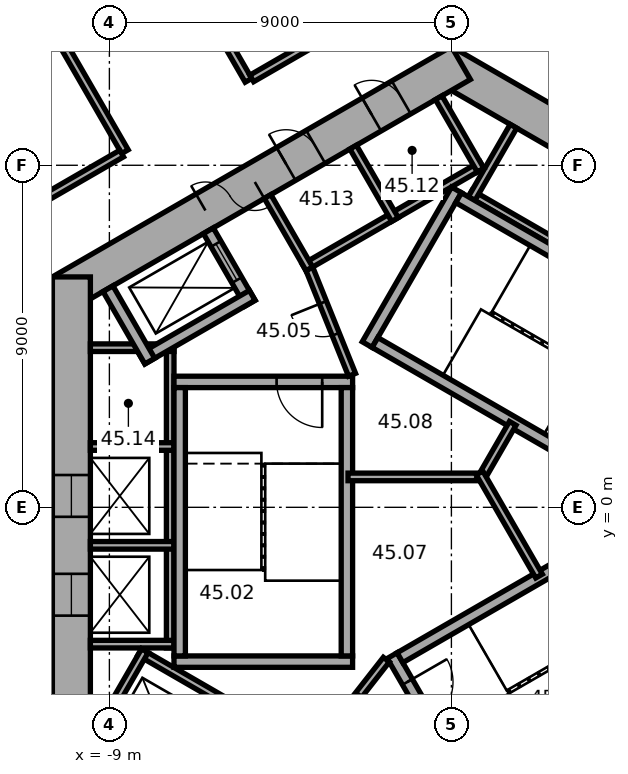
"""IFC4 building model, lengths in metres.
Left out: names, types, materials, properties, quantities, classifications, styles, units other than length and angle.
Written with IfcOpenShell. Run it as: python <this file> out.ifc"""

import sys

from ifc_helpers import new_model, si_unit, direction, frame, frame_2d, origin, place, context, subcontext, project, spatial, rectangle, extrude, element, fill, save


model = new_model("IFC4")
c1 = context("Model", 3, precision=1e-05, world=origin(), true_north=direction((0.0, 1.0)))
c2 = subcontext(c1, "Body", "Model", "MODEL_VIEW")
j1 = project(units=[si_unit("LENGTHUNIT", "METRE"), si_unit("PLANEANGLEUNIT", "RADIAN")], contexts=[c1])
p1 = place(None, origin())
s1 = spatial("IfcSite", under=j1, at=p1, CompositionType="ELEMENT")
p2 = place(p1, origin())
s2 = spatial("IfcBuilding", under=s1, at=p2, CompositionType="ELEMENT")
p3 = place(p2, frame((0.0, 0.0, 183.6)))
s3 = spatial("IfcBuildingStorey", under=s2, at=p3, CompositionType="ELEMENT", Elevation=183.6)
p4 = place(p3, frame((10.25, 5.629, 0.0), z_axis=(0.0, 0.0, 1.0), x_axis=(-0.866022616891, 0.50000482701, 0.0)))
e1 = element("IfcWall", 1, at=p4, inside=s3, PredefinedType="SHEAR", context=c2, shape_type="SweptSolid", body=[
    extrude(rectangle(XDim=12.125, YDim=1.0, at=frame_2d((6.062, 0.0))), origin(), (0.0, 0.0, 1.0), 3.7),
])
p5 = place(p4, frame((5.312, 0.0, 0.0)))
e2 = element("IfcOpeningElement", 2, at=p5, cuts=e1, PredefinedType="OPENING", context=c2, shape_type="SweptSolid", body=[
    extrude(rectangle(XDim=0.9, YDim=2.1, at=frame_2d((0.45, 1.05))), frame((0.0, 0.51, 0.0), z_axis=(0.0, -1.0, 0.0), x_axis=(1.0, 0.0, 0.0)), (0.0, 0.0, 1.0), 1.02),
])
p6 = place(p3, frame((0.25, 11.691, 0.0), z_axis=(0.0, 0.0, 1.0), x_axis=(-0.866022616891, -0.50000482701, 0.0)))
e3 = element("IfcWall", 3, at=p6, inside=s3, PredefinedType="SHEAR", context=c2, shape_type="SweptSolid", body=[
    extrude(rectangle(XDim=12.125, YDim=1.0, at=frame_2d((6.062, 0.0))), origin(), (0.0, 0.0, 1.0), 3.7),
])
p7 = place(p6, frame((6.262, 0.0, 0.0)))
e4 = element("IfcOpeningElement", 4, at=p7, cuts=e3, PredefinedType="OPENING", context=c2, shape_type="SweptSolid", body=[
    extrude(rectangle(XDim=1.5, YDim=2.1, at=frame_2d((0.75, 1.05))), frame((0.0, 0.51, 0.0), z_axis=(0.0, -1.0, 0.0), x_axis=(1.0, 0.0, 0.0)), (0.0, 0.0, 1.0), 1.02),
])
p8 = place(p6, frame((1.812, 0.0, 0.0)))
e5 = element("IfcOpeningElement", 5, at=p8, cuts=e3, PredefinedType="OPENING", context=c2, shape_type="SweptSolid", body=[
    extrude(rectangle(XDim=0.9, YDim=2.1, at=frame_2d((0.45, 1.05))), frame((0.0, 0.51, 0.0), z_axis=(0.0, -1.0, 0.0), x_axis=(1.0, 0.0, 0.0)), (0.0, 0.0, 1.0), 1.02),
])
p9 = place(p6, frame((4.412, 0.0, 0.0)))
e6 = element("IfcOpeningElement", 6, at=p9, cuts=e3, PredefinedType="OPENING", context=c2, shape_type="SweptSolid", body=[
    extrude(rectangle(XDim=0.9, YDim=2.1, at=frame_2d((0.45, 1.05))), frame((0.0, 0.51, 0.0), z_axis=(0.0, -1.0, 0.0), x_axis=(1.0, 0.0, 0.0)), (0.0, 0.0, 1.0), 1.02),
])
p10 = place(p3, frame((-10.0, 6.062, 0.0), z_axis=(0.0, 0.0, 1.0), x_axis=(0.0, -1.0, 0.0)))
e7 = element("IfcWall", 7, at=p10, inside=s3, PredefinedType="SHEAR", context=c2, shape_type="SweptSolid", body=[
    extrude(rectangle(XDim=12.125, YDim=1.0, at=frame_2d((6.062, 0.0))), origin(), (0.0, 0.0, 1.0), 3.7),
])
p11 = place(p10, frame((5.212, 0.0, 0.0)))
e8 = element("IfcOpeningElement", 8, at=p11, cuts=e7, PredefinedType="OPENING", context=c2, shape_type="SweptSolid", body=[
    extrude(rectangle(XDim=1.1, YDim=2.1, at=frame_2d((0.55, 1.05))), frame((0.0, 0.51, 0.0), z_axis=(0.0, -1.0, 0.0), x_axis=(1.0, 0.0, 0.0)), (0.0, 0.0, 1.0), 1.02),
])
p12 = place(p10, frame((7.812, 0.0, 0.0)))
e9 = element("IfcOpeningElement", 9, at=p12, cuts=e7, PredefinedType="OPENING", context=c2, shape_type="SweptSolid", body=[
    extrude(rectangle(XDim=1.1, YDim=2.1, at=frame_2d((0.55, 1.05))), frame((0.0, 0.51, 0.0), z_axis=(0.0, -1.0, 0.0), x_axis=(1.0, 0.0, 0.0)), (0.0, 0.0, 1.0), 1.02),
])
p13 = place(p3, frame((7.424, 4.259, 0.0), z_axis=(0.0, 0.0, 1.0), x_axis=(-0.866026010844, 0.49999894854, 0.0)))
e10 = element("IfcWall", 10, at=p13, inside=s3, PredefinedType="PARTITIONING", context=c2, shape_type="SweptSolid", body=[
    extrude(rectangle(XDim=8.0, YDim=0.2, at=frame_2d((4.0, 0.0))), origin(), (0.0, 0.0, 1.0), 3.42),
])
p14 = place(p3, frame((0.532, 8.122, 0.0), z_axis=(0.0, 0.0, 1.0), x_axis=(0.500077893725, 0.86598042715, 0.0)))
e11 = element("IfcWall", 11, at=p14, inside=s3, PredefinedType="PARTITIONING", context=c2, shape_type="SweptSolid", body=[
    extrude(rectangle(XDim=2.2, YDim=0.2, at=frame_2d((1.1, 0.0))), origin(), (0.0, 0.0, 1.0), 3.42),
])
p15 = place(p3, frame((0.803, 9.009, 0.0), z_axis=(0.0, 0.0, 1.0), x_axis=(-0.866028230842, -0.499995103361, 0.0)))
e12 = element("IfcWall", 12, at=p15, inside=s3, PredefinedType="PARTITIONING", context=c2, shape_type="SweptSolid", body=[
    extrude(rectangle(XDim=5.4, YDim=0.2, at=frame_2d((2.7, 0.0))), origin(), (0.0, 0.0, 1.0), 3.42),
])
p16 = place(p3, frame((0.767, 8.872, 0.0), z_axis=(0.0, 0.0, 1.0), x_axis=(-0.499994660107, 0.866028486751, 0.0)))
e13 = element("IfcWall", 13, at=p16, inside=s3, PredefinedType="PARTITIONING", context=c2, shape_type="SweptSolid", body=[
    extrude(rectangle(XDim=2.2, YDim=0.2, at=frame_2d((1.1, 0.0))), origin(), (0.0, 0.0, 1.0), 3.42),
])
for number, where, z_axis, x_axis in (
    (14, (-1.485, 7.572, 0.0), (0.0, 0.0, 1.0), (-0.5, 0.866, 0.0)),
    (15, (-3.737, 6.272, 0.0), (0.0, 0.0, 1.0), (-0.5, 0.866, 0.0)),
):
    element("IfcWall", number, at=place(p3, frame(where, z_axis=z_axis, x_axis=x_axis)), inside=s3, PredefinedType="PARTITIONING", context=c2, shape_type="SweptSolid", body=[
        extrude(rectangle(XDim=2.2, YDim=0.2, at=frame_2d((1.1, 0.0))), origin(), (0.0, 0.0, 1.0), 3.42),
    ])
p17 = place(p3, frame((-7.4, 4.3, 0.0), z_axis=(0.0, 0.0, 1.0), x_axis=(0.0, -1.0, 0.0)))
e16 = element("IfcWall", 16, at=p17, inside=s3, PredefinedType="PARTITIONING", context=c2, shape_type="SweptSolid", body=[
    extrude(rectangle(XDim=8.0, YDim=0.2, at=frame_2d((4.0, 0.0))), origin(), (0.0, 0.0, 1.0), 3.42),
])
for number, where, z_axis, x_axis in (
    (17, (-7.3, 4.2, 0.0), (0.0, 0.0, 1.0), (-1.0, 0.0, 0.0)),
    (18, (-7.3, 1.6, 0.0), (0.0, 0.0, 1.0), (-1.0, 0.0, 0.0)),
    (19, (-7.3, -1.0, 0.0), (0.0, 0.0, 1.0), (-1.0, 0.0, 0.0)),
    (20, (-7.3, -3.6, 0.0), (0.0, 0.0, 1.0), (-1.0, 0.0, 0.0)),
):
    element("IfcWall", number, at=place(p3, frame(where, z_axis=z_axis, x_axis=x_axis)), inside=s3, PredefinedType="PARTITIONING", context=c2, shape_type="SweptSolid", body=[
        extrude(rectangle(XDim=2.2, YDim=0.2, at=frame_2d((1.1, 0.0))), origin(), (0.0, 0.0, 1.0), 3.42),
    ])
p18 = place(p3, frame((-8.203, -3.809, 0.0), z_axis=(0.0, 0.0, 1.0), x_axis=(0.866028230842, -0.499995103361, 0.0)))
e21 = element("IfcWall", 21, at=p18, inside=s3, PredefinedType="PARTITIONING", context=c2, shape_type="SweptSolid", body=[
    extrude(rectangle(XDim=5.4, YDim=0.2, at=frame_2d((2.7, 0.0))), origin(), (0.0, 0.0, 1.0), 3.42),
])
p19 = place(p3, frame((-8.067, -3.772, 0.0), z_axis=(0.0, 0.0, 1.0), x_axis=(-0.50002983664, -0.866008176907, 0.0)))
e22 = element("IfcWall", 22, at=p19, inside=s3, PredefinedType="PARTITIONING", context=c2, shape_type="SweptSolid", body=[
    extrude(rectangle(XDim=2.2, YDim=0.2, at=frame_2d((1.1, 0.0))), origin(), (0.0, 0.0, 1.0), 3.42),
])
p20 = place(p3, frame((-0.024, -8.559, 0.0), z_axis=(0.0, 0.0, 1.0), x_axis=(0.866026010844, 0.49999894854, 0.0)))
e23 = element("IfcWall", 23, at=p20, inside=s3, PredefinedType="PARTITIONING", context=c2, shape_type="SweptSolid", body=[
    extrude(rectangle(XDim=8.0, YDim=0.2, at=frame_2d((4.0, 0.0))), origin(), (0.0, 0.0, 1.0), 3.42),
])
p21 = place(p3, frame((-2.216, 4.282, 0.0), z_axis=(0.0, 0.0, 1.0), x_axis=(0.499977259774, 0.866038532462, 0.0)))
e24 = element("IfcWall", 24, at=p21, inside=s3, PredefinedType="SHEAR", context=c2, shape_type="SweptSolid", body=[
    extrude(rectangle(XDim=4.7, YDim=0.3, at=frame_2d((2.35, 0.0))), origin(), (0.0, 0.0, 1.0), 3.42),
])
for number, where, z_axis, x_axis in (
    (25, (4.103, 0.807, 0.0), (0.0, 0.0, 1.0), (-0.866, 0.5, 0.0)),
    (26, (6.303, 4.617, 0.0), (0.0, 0.0, 1.0), (-0.866, 0.5, 0.0)),
):
    element("IfcWall", number, at=place(p3, frame(where, z_axis=z_axis, x_axis=x_axis)), inside=s3, PredefinedType="SHEAR", context=c2, shape_type="SweptSolid", body=[
        extrude(rectangle(XDim=7.06, YDim=0.3, at=frame_2d((3.53, 0.0))), origin(), (0.0, 0.0, 1.0), 3.42),
    ])
p22 = place(p3, frame((-2.6, 3.3, 0.0), z_axis=(0.0, 0.0, 1.0), x_axis=(-1.0, 0.0, 0.0)))
e27 = element("IfcWall", 27, at=p22, inside=s3, PredefinedType="SHEAR", context=c2, shape_type="SweptSolid", body=[
    extrude(rectangle(XDim=4.7, YDim=0.3, at=frame_2d((2.35, 0.0))), origin(), (0.0, 0.0, 1.0), 3.42),
])
p23 = place(p22, frame((0.8, 0.0, 0.0)))
e28 = element("IfcOpeningElement", 28, at=p23, cuts=e27, PredefinedType="OPENING", context=c2, shape_type="SweptSolid", body=[
    extrude(rectangle(XDim=1.2, YDim=2.1, at=frame_2d((0.6, 1.05))), frame((0.0, 0.16, 0.0), z_axis=(0.0, -1.0, 0.0), x_axis=(1.0, 0.0, 0.0)), (0.0, 0.0, 1.0), 0.32),
])
p24 = place(p3, frame((-2.6, -4.06, 0.0), z_axis=(0.0, 0.0, 1.0), x_axis=(-1.0, 0.0, 0.0)))
e29 = element("IfcWall", 29, at=p24, inside=s3, PredefinedType="SHEAR", context=c2, shape_type="SweptSolid", body=[
    extrude(rectangle(XDim=4.7, YDim=0.3, at=frame_2d((2.35, 0.0))), origin(), (0.0, 0.0, 1.0), 3.42),
])
for number, where, z_axis, x_axis in (
    (30, (-2.75, 3.15, 0.0), (0.0, 0.0, 1.0), (0.0, -1.0, 0.0)),
    (31, (-7.15, 3.15, 0.0), (0.0, 0.0, 1.0), (0.0, -1.0, 0.0)),
):
    element("IfcWall", number, at=place(p3, frame(where, z_axis=z_axis, x_axis=x_axis)), inside=s3, PredefinedType="SHEAR", context=c2, shape_type="SweptSolid", body=[
        extrude(rectangle(XDim=7.06, YDim=0.3, at=frame_2d((3.53, 0.0))), origin(), (0.0, 0.0, 1.0), 3.42),
    ])
p25 = place(p3, frame((-1.558, -3.902, 0.0), z_axis=(0.0, 0.0, 1.0), x_axis=(0.499977259774, -0.866038532462, 0.0)))
e32 = element("IfcWall", 32, at=p25, inside=s3, PredefinedType="SHEAR", context=c2, shape_type="SweptSolid", body=[
    extrude(rectangle(XDim=4.7, YDim=0.3, at=frame_2d((2.35, 0.0))), origin(), (0.0, 0.0, 1.0), 3.42),
])
p26 = place(p25, frame((0.8, 0.0, 0.0)))
e33 = element("IfcOpeningElement", 33, at=p26, cuts=e32, PredefinedType="OPENING", context=c2, shape_type="SweptSolid", body=[
    extrude(rectangle(XDim=1.2, YDim=2.1, at=frame_2d((0.6, 1.05))), frame((0.0, 0.16, 0.0), z_axis=(0.0, -1.0, 0.0), x_axis=(1.0, 0.0, 0.0)), (0.0, 0.0, 1.0), 0.32),
])
for number, where, z_axis, x_axis in (
    (34, (-1.353, -3.957, 0.0), (0.0, 0.0, 1.0), (0.866, 0.5, 0.0)),
    (35, (0.847, -7.767, 0.0), (0.0, 0.0, 1.0), (0.866, 0.5, 0.0)),
):
    element("IfcWall", number, at=place(p3, frame(where, z_axis=z_axis, x_axis=x_axis)), inside=s3, PredefinedType="SHEAR", context=c2, shape_type="SweptSolid", body=[
        extrude(rectangle(XDim=7.06, YDim=0.3, at=frame_2d((3.53, 0.0))), origin(), (0.0, 0.0, 1.0), 3.42),
    ])
p27 = place(p3, frame((-5.295, 5.372, 0.0), z_axis=(0.0, 0.0, 1.0), x_axis=(-0.500077893725, 0.86598042715, 0.0)))
e36 = element("IfcWall", 36, at=p27, inside=s3, PredefinedType="SHEAR", context=c2, shape_type="SweptSolid", body=[
    extrude(rectangle(XDim=2.2, YDim=0.3, at=frame_2d((1.1, 0.0))), origin(), (0.0, 0.0, 1.0), 3.42),
])
p28 = place(p27, frame((0.7, 0.0, 0.0)))
e37 = element("IfcOpeningElement", 37, at=p28, cuts=e36, PredefinedType="OPENING", context=c2, shape_type="SweptSolid", body=[
    extrude(rectangle(XDim=1.1, YDim=2.1, at=frame_2d((0.55, 1.05))), frame((0.0, 0.16, 0.0), z_axis=(0.0, -1.0, 0.0), x_axis=(1.0, 0.0, 0.0)), (0.0, 0.0, 1.0), 0.32),
])
p29 = place(p3, frame((-5.24, 5.577, 0.0), z_axis=(0.0, 0.0, 1.0), x_axis=(-0.866014461049, -0.500018952895, 0.0)))
e38 = element("IfcWall", 38, at=p29, inside=s3, PredefinedType="SHEAR", context=c2, shape_type="SweptSolid", body=[
    extrude(rectangle(XDim=3.35, YDim=0.3, at=frame_2d((1.675, 0.0))), origin(), (0.0, 0.0, 1.0), 3.42),
])
p30 = place(p3, frame((-7.937, 3.847, 0.0), z_axis=(0.0, 0.0, 1.0), x_axis=(-0.50002983664, 0.866008176907, 0.0)))
e39 = element("IfcWall", 39, at=p30, inside=s3, PredefinedType="SHEAR", context=c2, shape_type="SweptSolid", body=[
    extrude(rectangle(XDim=2.2, YDim=0.3, at=frame_2d((1.1, 0.0))), origin(), (0.0, 0.0, 1.0), 3.42),
])
p31 = place(p3, frame((-2.615, 3.487, 0.0), z_axis=(0.0, 0.0, 1.0), x_axis=(-0.373576831041, 0.92759924068, 0.0)))
e40 = element("IfcWall", 40, at=p31, inside=s3, PredefinedType="PARTITIONING", context=c2, shape_type="SweptSolid", body=[
    extrude(rectangle(XDim=3.002, YDim=0.2, at=frame_2d((1.501, 0.0))), origin(), (0.0, 0.0, 1.0), 3.42),
])
p32 = place(p31, frame((1.15, 0.0, 0.0)))
e41 = element("IfcOpeningElement", 41, at=p32, cuts=e40, PredefinedType="OPENING", context=c2, shape_type="SweptSolid", body=[
    extrude(rectangle(XDim=0.9, YDim=2.1, at=frame_2d((0.45, 1.05))), frame((0.0, 0.11, 0.0), z_axis=(0.0, -1.0, 0.0), x_axis=(1.0, 0.0, 0.0)), (0.0, 0.0, 1.0), 0.22),
])
p33 = place(p3, frame((-1.712, -4.008, 0.0), z_axis=(0.0, 0.0, 1.0), x_axis=(-0.616549420702, -0.787316208287, 0.0)))
e42 = element("IfcWall", 42, at=p33, inside=s3, PredefinedType="PARTITIONING", context=c2, shape_type="SweptSolid", body=[
    extrude(rectangle(XDim=3.002, YDim=0.2, at=frame_2d((1.501, 0.0))), origin(), (0.0, 0.0, 1.0), 3.42),
])
p34 = place(p33, frame((1.15, 0.0, 0.0)))
e43 = element("IfcOpeningElement", 43, at=p34, cuts=e42, PredefinedType="OPENING", context=c2, shape_type="SweptSolid", body=[
    extrude(rectangle(XDim=0.9, YDim=2.1, at=frame_2d((0.45, 1.05))), frame((0.0, 0.11, 0.0), z_axis=(0.0, -1.0, 0.0), x_axis=(1.0, 0.0, 0.0)), (0.0, 0.0, 1.0), 0.22),
])
p35 = place(p3, frame((0.92, 0.8, 0.0), z_axis=(0.0, 0.0, 1.0), x_axis=(-1.0, 0.0, 0.0)))
e44 = element("IfcWall", 44, at=p35, inside=s3, PredefinedType="PARTITIONING", context=c2, shape_type="SweptSolid", body=[
    extrude(rectangle(XDim=3.64, YDim=0.2, at=frame_2d((1.82, 0.0))), origin(), (0.0, 0.0, 1.0), 3.42),
])
p36 = place(p3, frame((0.74, 0.696, 0.0), z_axis=(0.0, 0.0, 1.0), x_axis=(0.499956301907, 0.86605063142, 0.0)))
e45 = element("IfcWall", 45, at=p36, inside=s3, PredefinedType="PARTITIONING", context=c2, shape_type="SweptSolid", body=[
    extrude(rectangle(XDim=1.747, YDim=0.2, at=frame_2d((0.874, 0.0))), origin(), (0.0, 0.0, 1.0), 3.42),
])
p37 = place(p3, frame((0.74, 0.904, 0.0), z_axis=(0.0, 0.0, 1.0), x_axis=(0.500028278809, -0.866009076391, 0.0)))
e46 = element("IfcWall", 46, at=p37, inside=s3, PredefinedType="PARTITIONING", context=c2, shape_type="SweptSolid", body=[
    extrude(rectangle(XDim=3.133, YDim=0.2, at=frame_2d((1.566, 0.0))), origin(), (0.0, 0.0, 1.0), 3.42),
])
p38 = place(p3, frame((-12.766, 16.589, 0.0), z_axis=(0.0, 0.0, 1.0), x_axis=(0.500010139422, -0.866019549707, 0.0)))
e47 = element("IfcWall", 47, at=p38, inside=s3, PredefinedType="PARTITIONING", context=c2, shape_type="SweptSolid", body=[
    extrude(rectangle(XDim=8.35, YDim=0.2, at=frame_2d((4.175, 0.0))), origin(), (0.0, 0.0, 1.0), 3.42),
])
p39 = place(p38, frame((3.675, 0.0, 0.0)))
e48 = element("IfcOpeningElement", 48, at=p39, cuts=e47, PredefinedType="OPENING", context=c2, shape_type="SweptSolid", body=[
    extrude(rectangle(XDim=1.0, YDim=2.1, at=frame_2d((0.5, 1.05))), frame((0.0, 0.11, 0.0), z_axis=(0.0, -1.0, 0.0), x_axis=(1.0, 0.0, 0.0)), (0.0, 0.0, 1.0), 0.22),
])
p40 = place(p3, frame((-9.515, 18.466, 0.0), z_axis=(0.0, 0.0, 1.0), x_axis=(0.500010139422, -0.866019549707, 0.0)))
e49 = element("IfcWall", 49, at=p40, inside=s3, PredefinedType="PARTITIONING", context=c2, shape_type="SweptSolid", body=[
    extrude(rectangle(XDim=8.35, YDim=0.2, at=frame_2d((4.175, 0.0))), origin(), (0.0, 0.0, 1.0), 2.87),
])
p41 = place(p40, frame((3.675, 0.0, 0.0)))
e50 = element("IfcOpeningElement", 50, at=p41, cuts=e49, PredefinedType="OPENING", context=c2, shape_type="SweptSolid", body=[
    extrude(rectangle(XDim=1.0, YDim=2.1, at=frame_2d((0.5, 1.05))), frame((0.0, 0.11, 0.0), z_axis=(0.0, -1.0, 0.0), x_axis=(1.0, 0.0, 0.0)), (0.0, 0.0, 1.0), 0.22),
])
p42 = place(p3, frame((-8.678, 9.308, 0.0), z_axis=(0.0, 0.0, 1.0), x_axis=(-0.866000359435, -0.500043375578, 0.0)))
e51 = element("IfcWall", 51, at=p42, inside=s3, PredefinedType="PARTITIONING", context=c2, shape_type="SweptSolid", body=[
    extrude(rectangle(XDim=3.161, YDim=0.2, at=frame_2d((1.581, 0.0))), origin(), (0.0, 0.0, 1.0), 3.42),
])
p43 = place(p3, frame((-1.167, 13.645, 0.0), z_axis=(0.0, 0.0, 1.0), x_axis=(-0.866034830959, -0.499983671299, 0.0)))
e52 = element("IfcWall", 52, at=p43, inside=s3, PredefinedType="PARTITIONING", context=c2, shape_type="SweptSolid", body=[
    extrude(rectangle(XDim=4.719, YDim=0.2, at=frame_2d((2.36, 0.0))), origin(), (0.0, 0.0, 1.0), 3.42),
])
p44 = place(p3, frame((11.196, 7.854, 0.0), z_axis=(0.0, 0.0, 1.0), x_axis=(-0.866023877043, 0.500002644385, 0.0)))
e53 = element("IfcWall", 53, at=p44, inside=s3, PredefinedType="PARTITIONING", context=c2, shape_type="SweptSolid", body=[
    extrude(rectangle(XDim=11.792, YDim=0.2, at=frame_2d((5.896, 0.0))), origin(), (0.0, 0.0, 1.0), 3.42),
])
p45 = place(p44, frame((3.261, 0.0, 0.0)))
e54 = element("IfcOpeningElement", 54, at=p45, cuts=e53, PredefinedType="OPENING", context=c2, shape_type="SweptSolid", body=[
    extrude(rectangle(XDim=1.0, YDim=2.1, at=frame_2d((0.5, 1.05))), frame((0.0, 0.11, 0.0), z_axis=(0.0, -1.0, 0.0), x_axis=(1.0, 0.0, 0.0)), (0.0, 0.0, 1.0), 0.22),
])
p46 = place(p7, origin())
e55 = element("IfcDoor", 55, at=p46, inside=s3, OperationType="DOUBLE_DOOR_SINGLE_SWING", PredefinedType="DOOR", context=c2, shape_type="SweptSolid", body=[
    extrude(rectangle(XDim=1.5, YDim=2.1, at=frame_2d((0.75, 1.05))), frame((0.0, 0.025, 0.0), z_axis=(0.0, -1.0, 0.0), x_axis=(1.0, 0.0, 0.0)), (0.0, 0.0, 1.0), 0.05),
])
fill(e4, e55)
p47 = place(p23, origin())
e56 = element("IfcDoor", 56, at=p47, inside=s3, OperationType="SINGLE_SWING_RIGHT", PredefinedType="DOOR", context=c2, shape_type="SweptSolid", body=[
    extrude(rectangle(XDim=1.2, YDim=2.1, at=frame_2d((0.6, 1.05))), frame((0.0, 0.025, 0.0), z_axis=(0.0, -1.0, 0.0), x_axis=(1.0, 0.0, 0.0)), (0.0, 0.0, 1.0), 0.05),
])
fill(e28, e56)
p48 = place(p26, origin())
e57 = element("IfcDoor", 57, at=p48, inside=s3, OperationType="SINGLE_SWING_RIGHT", PredefinedType="DOOR", context=c2, shape_type="SweptSolid", body=[
    extrude(rectangle(XDim=1.2, YDim=2.1, at=frame_2d((0.6, 1.05))), frame((0.0, 0.025, 0.0), z_axis=(0.0, -1.0, 0.0), x_axis=(1.0, 0.0, 0.0)), (0.0, 0.0, 1.0), 0.05),
])
fill(e33, e57)
p49 = place(p32, origin())
e58 = element("IfcDoor", 58, at=p49, inside=s3, OperationType="SINGLE_SWING_LEFT", PredefinedType="DOOR", context=c2, shape_type="SweptSolid", body=[
    extrude(rectangle(XDim=0.9, YDim=2.1, at=frame_2d((0.45, 1.05))), frame((0.0, 0.025, 0.0), z_axis=(0.0, -1.0, 0.0), x_axis=(1.0, 0.0, 0.0)), (0.0, 0.0, 1.0), 0.05),
])
fill(e41, e58)
p50 = place(p34, origin())
e59 = element("IfcDoor", 59, at=p50, inside=s3, OperationType="SINGLE_SWING_LEFT", PredefinedType="DOOR", context=c2, shape_type="SweptSolid", body=[
    extrude(rectangle(XDim=0.9, YDim=2.1, at=frame_2d((0.45, 1.05))), frame((0.0, 0.025, 0.0), z_axis=(0.0, -1.0, 0.0), x_axis=(1.0, 0.0, 0.0)), (0.0, 0.0, 1.0), 0.05),
])
fill(e43, e59)
p51 = place(p8, origin())
e60 = element("IfcDoor", 60, at=p51, inside=s3, OperationType="SINGLE_SWING_LEFT", PredefinedType="DOOR", context=c2, shape_type="SweptSolid", body=[
    extrude(rectangle(XDim=0.9, YDim=2.1, at=frame_2d((0.45, 1.05))), frame((0.0, 0.025, 0.0), z_axis=(0.0, -1.0, 0.0), x_axis=(1.0, 0.0, 0.0)), (0.0, 0.0, 1.0), 0.05),
])
fill(e5, e60)
p52 = place(p9, origin())
e61 = element("IfcDoor", 61, at=p52, inside=s3, OperationType="SINGLE_SWING_LEFT", PredefinedType="DOOR", context=c2, shape_type="SweptSolid", body=[
    extrude(rectangle(XDim=0.9, YDim=2.1, at=frame_2d((0.45, 1.05))), frame((0.0, 0.025, 0.0), z_axis=(0.0, -1.0, 0.0), x_axis=(1.0, 0.0, 0.0)), (0.0, 0.0, 1.0), 0.05),
])
fill(e6, e61)
p53 = place(p28, origin())
e62 = element("IfcDoor", 62, at=p53, inside=s3, OperationType="DOUBLE_DOOR_SLIDING", PredefinedType="DOOR", context=c2, shape_type="SweptSolid", body=[
    extrude(rectangle(XDim=1.1, YDim=2.1, at=frame_2d((0.55, 1.05))), frame((0.0, 0.025, 0.0), z_axis=(0.0, -1.0, 0.0), x_axis=(1.0, 0.0, 0.0)), (0.0, 0.0, 1.0), 0.05),
])
fill(e37, e62)
p54 = place(p11, origin())
e63 = element("IfcDoor", 63, at=p54, inside=s3, OperationType="DOUBLE_DOOR_SLIDING", PredefinedType="DOOR", context=c2, shape_type="SweptSolid", body=[
    extrude(rectangle(XDim=1.1, YDim=2.1, at=frame_2d((0.55, 1.05))), frame((0.0, 0.025, 0.0), z_axis=(0.0, -1.0, 0.0), x_axis=(1.0, 0.0, 0.0)), (0.0, 0.0, 1.0), 0.05),
])
fill(e8, e63)
p55 = place(p12, origin())
e64 = element("IfcDoor", 64, at=p55, inside=s3, OperationType="DOUBLE_DOOR_SLIDING", PredefinedType="DOOR", context=c2, shape_type="SweptSolid", body=[
    extrude(rectangle(XDim=1.1, YDim=2.1, at=frame_2d((0.55, 1.05))), frame((0.0, 0.025, 0.0), z_axis=(0.0, -1.0, 0.0), x_axis=(1.0, 0.0, 0.0)), (0.0, 0.0, 1.0), 0.05),
])
fill(e9, e64)
save(model, sys.argv[1])
